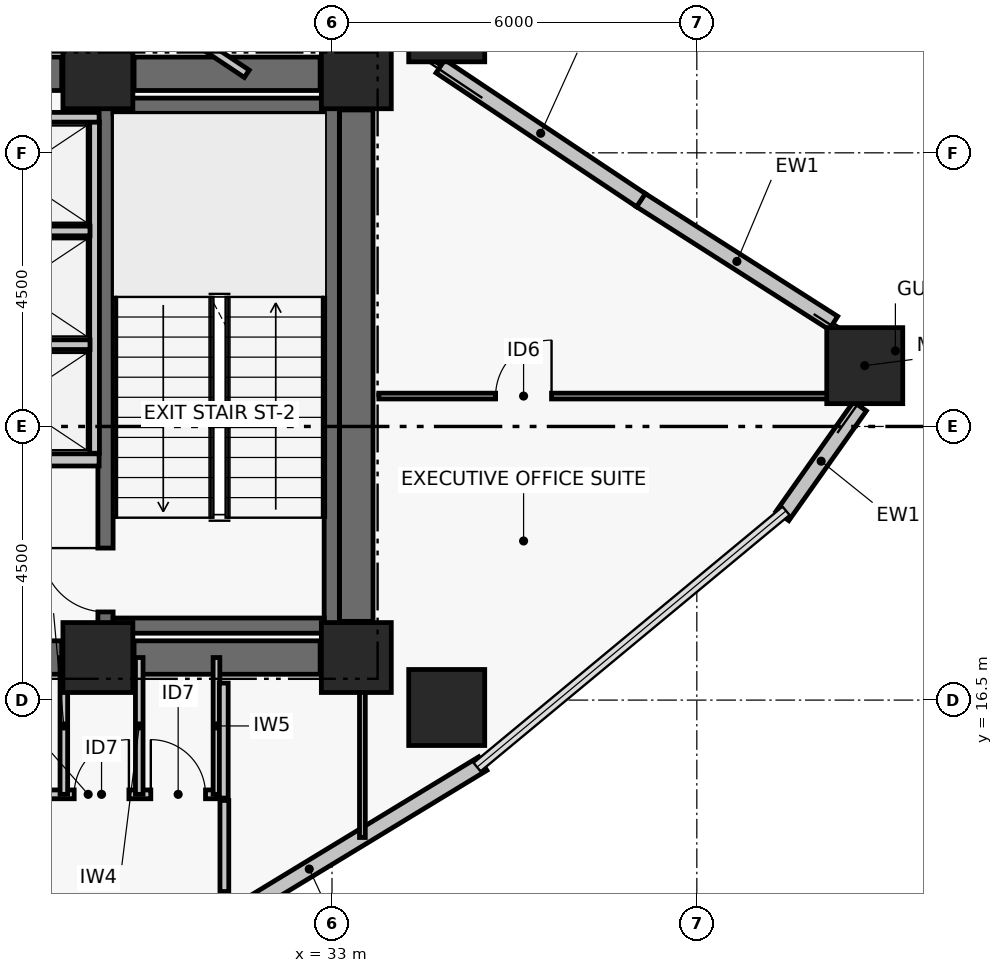
"""IFC4 building model, lengths in metres.
Left out: names, types, materials, properties, quantities, classifications, styles, units other than length and angle.
Written with IfcOpenShell. Run it as: python <this file> out.ifc"""

import sys

from ifc_helpers import new_model, si_unit, direction, frame, frame_2d, origin, origin_2d, place, context, subcontext, project, spatial, rectangle, hollow_rectangle, extrude, element, fill, save


model = new_model("IFC4")
c1 = context("Model", 3, precision=1e-05, world=origin(), true_north=direction((0.0, 1.0)))
c2 = subcontext(c1, "Body", "Model", "MODEL_VIEW")
j1 = project(units=[si_unit("LENGTHUNIT", "METRE"), si_unit("PLANEANGLEUNIT", "RADIAN")], contexts=[c1])
p1 = place(None, origin())
s1 = spatial("IfcSite", under=j1, at=p1, CompositionType="ELEMENT")
p2 = place(p1, origin())
s2 = spatial("IfcBuilding", under=s1, at=p2, CompositionType="ELEMENT")
p3 = place(p2, frame((0.0, 0.0, 103.98)))
s3 = spatial("IfcBuildingStorey", under=s2, at=p3, CompositionType="ELEMENT", Elevation=103.98)
for number, where, z_axis, x_axis in (
    (1, (29.15, 17.2, 0.0), (0.0, 0.0, 1.0), (1.0, 0.0, 0.0)),
    (2, (33.4, 17.2, 0.0), (0.0, 0.0, 1.0), (1.0, 0.0, 0.0)),
    (3, (29.15, 26.8, 0.0), (0.0, 0.0, 1.0), (1.0, 0.0, 0.0)),
    (4, (33.4, 26.8, 0.0), (0.0, 0.0, 1.0), (1.0, 0.0, 0.0)),
):
    element("IfcColumn", number, at=place(p3, frame(where, z_axis=z_axis, x_axis=x_axis)), inside=s3, PredefinedType="COLUMN", context=c2, shape_type="SweptSolid", body=[
        extrude(rectangle(XDim=1.15, YDim=1.15, at=origin_2d()), origin(), (0.0, 0.0, 1.0), 3.72),
    ])
p4 = place(p3, frame((26.85, 17.2, 0.0), z_axis=(0.0, 0.0, 1.0), x_axis=(1.0, 0.0, 0.0)))
e5 = element("IfcWall", 5, at=p4, inside=s3, PredefinedType="SHEAR", context=c2, shape_type="SweptSolid", body=[
    extrude(rectangle(XDim=1.705, YDim=0.55, at=frame_2d((0.853, 0.0))), origin(), (0.0, 0.0, 1.0), 3.47),
])
p5 = place(p3, frame((29.745, 17.2, 0.0), z_axis=(0.0, 0.0, 1.0), x_axis=(1.0, 0.0, 0.0)))
e6 = element("IfcWall", 6, at=p5, inside=s3, PredefinedType="SHEAR", context=c2, shape_type="SweptSolid", body=[
    extrude(rectangle(XDim=3.06, YDim=0.55, at=frame_2d((1.53, 0.0))), origin(), (0.0, 0.0, 1.0), 3.47),
])
p6 = place(p3, frame((26.85, 26.8, 0.0), z_axis=(0.0, 0.0, 1.0), x_axis=(1.0, 0.0, 0.0)))
e7 = element("IfcWall", 7, at=p6, inside=s3, PredefinedType="SHEAR", context=c2, shape_type="SweptSolid", body=[
    extrude(rectangle(XDim=1.705, YDim=0.55, at=frame_2d((0.853, 0.0))), origin(), (0.0, 0.0, 1.0), 3.47),
])
p7 = place(p3, frame((29.745, 26.8, 0.0), z_axis=(0.0, 0.0, 1.0), x_axis=(1.0, 0.0, 0.0)))
e8 = element("IfcWall", 8, at=p7, inside=s3, PredefinedType="SHEAR", context=c2, shape_type="SweptSolid", body=[
    extrude(rectangle(XDim=3.06, YDim=0.55, at=frame_2d((1.53, 0.0))), origin(), (0.0, 0.0, 1.0), 3.47),
])
p8 = place(p3, frame((33.4, 17.795, 0.0), z_axis=(0.0, 0.0, 1.0), x_axis=(0.0, 1.0, 0.0)))
e9 = element("IfcWall", 9, at=p8, inside=s3, PredefinedType="SHEAR", context=c2, shape_type="SweptSolid", body=[
    extrude(rectangle(XDim=8.41, YDim=0.55, at=frame_2d((4.205, 0.0))), origin(), (0.0, 0.0, 1.0), 3.47),
])
p9 = place(p3, frame((29.275, 17.6, 0.0), z_axis=(0.0, 0.0, 1.0), x_axis=(0.0, 1.0, 0.0)))
e10 = element("IfcWall", 10, at=p9, inside=s3, PredefinedType="SHEAR", context=c2, shape_type="SweptSolid", body=[
    extrude(rectangle(XDim=8.8, YDim=0.25, at=frame_2d((4.4, 0.0))), origin(), (0.0, 0.0, 1.0), 3.47),
])
p10 = place(p9, frame((0.35, 0.0, 0.0)))
e11 = element("IfcOpeningElement", 11, at=p10, cuts=e10, PredefinedType="OPENING", context=c2, shape_type="SweptSolid", body=[
    extrude(rectangle(XDim=1.05, YDim=2.08, at=frame_2d((0.525, 1.04))), frame((0.0, 0.135, 0.0), z_axis=(0.0, -1.0, 0.0), x_axis=(1.0, 0.0, 0.0)), (0.0, 0.0, 1.0), 0.27),
])
p11 = place(p3, frame((32.996, 17.6, 0.0), z_axis=(0.0, 0.0, 1.0), x_axis=(0.0, 1.0, 0.0)))
e12 = element("IfcWall", 12, at=p11, inside=s3, PredefinedType="SHEAR", context=c2, shape_type="SweptSolid", body=[
    extrude(rectangle(XDim=8.8, YDim=0.25, at=frame_2d((4.4, 0.0))), origin(), (0.0, 0.0, 1.0), 3.47),
])
for number, where, z_axis, x_axis in (
    (13, (29.4, 17.725, 0.0), (0.0, 0.0, 1.0), (1.0, 0.0, 0.0)),
    (14, (29.4, 26.275, 0.0), (0.0, 0.0, 1.0), (1.0, 0.0, 0.0)),
):
    element("IfcWall", number, at=place(p3, frame(where, z_axis=z_axis, x_axis=x_axis)), inside=s3, PredefinedType="SHEAR", context=c2, shape_type="SweptSolid", body=[
        extrude(rectangle(XDim=3.471, YDim=0.25, at=frame_2d((1.736, 0.0))), origin(), (0.0, 0.0, 1.0), 3.47),
    ])
for number, where, z_axis, x_axis in (
    (15, (41.762, 22.0, 0.0), (0.0, 0.0, 1.0), (1.0, 0.0, 0.0)),
    (16, (34.887, 27.622, 0.0), (0.0, 0.0, 1.0), (1.0, 0.0, 0.0)),
    (17, (34.887, 16.378, 0.0), (0.0, 0.0, 1.0), (1.0, 0.0, 0.0)),
):
    element("IfcColumn", number, at=place(p3, frame(where, z_axis=z_axis, x_axis=x_axis)), inside=s3, PredefinedType="COLUMN", context=c2, shape_type="SweptSolid", body=[
        extrude(hollow_rectangle(XDim=1.25, YDim=1.25, WallThickness=0.05, at=origin_2d()), origin(), (0.0, 0.0, 1.0), 3.72),
    ])
p12 = place(p3, frame((41.682, 21.331, 0.0), z_axis=(0.0, 0.0, 1.0), x_axis=(-0.577134204686, -0.816649318729, 0.0)))
e18 = element("IfcWall", 18, at=p12, inside=s3, PredefinedType="PARTITIONING", context=c2, shape_type="SweptSolid", body=[
    extrude(rectangle(XDim=2.21, YDim=0.26, at=frame_2d((1.105, 0.0))), origin(), (0.0, 0.0, 1.0), 3.47),
])
p13 = place(p3, frame((38.072, 24.727, 0.0), z_axis=(0.0, 0.0, 1.0), x_axis=(0.843033549628, -0.537860980367, 0.0)))
e19 = element("IfcWall", 19, at=p13, inside=s3, PredefinedType="PARTITIONING", context=c2, shape_type="SweptSolid", body=[
    extrude(rectangle(XDim=3.766, YDim=0.26, at=frame_2d((1.883, 0.0))), origin(), (0.0, 0.0, 1.0), 2.9),
])
p14 = place(p3, frame((34.783, 26.922, 0.0), z_axis=(0.0, 0.0, 1.0), x_axis=(0.831718676225, -0.555197301523, 0.0)))
e20 = element("IfcWall", 20, at=p14, inside=s3, PredefinedType="PARTITIONING", context=c2, shape_type="SweptSolid", body=[
    extrude(rectangle(XDim=3.966, YDim=0.26, at=frame_2d((1.983, 0.0))), origin(), (0.0, 0.0, 1.0), 2.77),
])
p15 = place(p3, frame((35.48, 15.455, 0.0), z_axis=(0.0, 0.0, 1.0), x_axis=(-0.854673977685, -0.51916509115, 0.0)))
e21 = element("IfcWall", 21, at=p15, inside=s3, PredefinedType="PARTITIONING", context=c2, shape_type="SweptSolid", body=[
    extrude(rectangle(XDim=6.678, YDim=0.26, at=frame_2d((3.339, 0.0))), origin(), (0.0, 0.0, 1.0), 3.47),
])
p16 = place(p3, frame((26.37, 20.45, 0.0), z_axis=(0.0, 0.0, 1.0), x_axis=(1.0, 0.0, 0.0)))
e22 = element("IfcWall", 22, at=p16, inside=s3, PredefinedType="PARTITIONING", context=c2, shape_type="SweptSolid", body=[
    extrude(rectangle(XDim=2.8, YDim=0.2, at=frame_2d((1.4, 0.0))), origin(), (0.0, 0.0, 1.0), 3.47),
])
p17 = place(p16, frame((0.78, 0.0, 0.0)))
e23 = element("IfcOpeningElement", 23, at=p17, cuts=e22, PredefinedType="OPENING", context=c2, shape_type="SweptSolid", body=[
    extrude(rectangle(XDim=1.1, YDim=2.08, at=frame_2d((0.55, 1.04))), frame((0.0, 0.11, 0.0), z_axis=(0.0, -1.0, 0.0), x_axis=(1.0, 0.0, 0.0)), (0.0, 0.0, 1.0), 0.22),
])
p18 = place(p3, frame((29.095, 20.56, 0.0), z_axis=(0.0, 0.0, 1.0), x_axis=(0.0, 1.0, 0.0)))
e24 = element("IfcWall", 24, at=p18, inside=s3, PredefinedType="PARTITIONING", context=c2, shape_type="SweptSolid", body=[
    extrude(rectangle(XDim=5.45, YDim=0.16, at=frame_2d((2.725, 0.0))), origin(), (0.0, 0.0, 1.0), 3.47),
])
p19 = place(p3, frame((26.37, 22.345, 0.0), z_axis=(0.0, 0.0, 1.0), x_axis=(1.0, 0.0, 0.0)))
e25 = element("IfcWall", 25, at=p19, inside=s3, PredefinedType="PARTITIONING", context=c2, shape_type="SweptSolid", body=[
    extrude(rectangle(XDim=2.65, YDim=0.16, at=frame_2d((1.325, 0.0))), origin(), (0.0, 0.0, 1.0), 3.47),
])
p20 = place(p3, frame((26.53, 24.215, 0.0), z_axis=(0.0, 0.0, 1.0), x_axis=(1.0, 0.0, 0.0)))
e26 = element("IfcWall", 26, at=p20, inside=s3, PredefinedType="PARTITIONING", context=c2, shape_type="SweptSolid", body=[
    extrude(rectangle(XDim=2.49, YDim=0.16, at=frame_2d((1.245, 0.0))), origin(), (0.0, 0.0, 1.0), 3.47),
])
p21 = place(p3, frame((26.34, 26.085, 0.0), z_axis=(0.0, 0.0, 1.0), x_axis=(1.0, 0.0, 0.0)))
e27 = element("IfcWall", 27, at=p21, inside=s3, PredefinedType="PARTITIONING", context=c2, shape_type="SweptSolid", body=[
    extrude(rectangle(XDim=2.83, YDim=0.16, at=frame_2d((1.415, 0.0))), origin(), (0.0, 0.0, 1.0), 3.47),
])
p22 = place(p3, frame((26.88, 14.95, 0.0), z_axis=(0.0, 0.0, 1.0), x_axis=(1.0, 0.0, 0.0)))
e28 = element("IfcWall", 28, at=p22, inside=s3, PredefinedType="PARTITIONING", context=c2, shape_type="SweptSolid", body=[
    extrude(rectangle(XDim=4.22, YDim=0.145, at=frame_2d((2.11, 0.0))), origin(), (0.0, 0.0, 1.0), 3.05),
])
p23 = place(p22, frame((0.39, 0.0, 0.0)))
e29 = element("IfcOpeningElement", 29, at=p23, cuts=e28, PredefinedType="OPENING", context=c2, shape_type="SweptSolid", body=[
    extrude(rectangle(XDim=0.92, YDim=2.05, at=frame_2d((0.46, 1.025))), frame((0.0, 0.083, 0.0), z_axis=(0.0, -1.0, 0.0), x_axis=(1.0, 0.0, 0.0)), (0.0, 0.0, 1.0), 0.165),
])
p24 = place(p22, frame((1.88, 0.0, 0.0)))
e30 = element("IfcOpeningElement", 30, at=p24, cuts=e28, PredefinedType="OPENING", context=c2, shape_type="SweptSolid", body=[
    extrude(rectangle(XDim=0.9, YDim=2.02, at=frame_2d((0.45, 1.01))), frame((0.0, 0.083, 0.0), z_axis=(0.0, -1.0, 0.0), x_axis=(1.0, 0.0, 0.0)), (0.0, 0.0, 1.0), 0.165),
])
p25 = place(p22, frame((3.14, 0.0, 0.0)))
e31 = element("IfcOpeningElement", 31, at=p25, cuts=e28, PredefinedType="OPENING", context=c2, shape_type="SweptSolid", body=[
    extrude(rectangle(XDim=0.9, YDim=2.02, at=frame_2d((0.45, 1.01))), frame((0.0, 0.083, 0.0), z_axis=(0.0, -1.0, 0.0), x_axis=(1.0, 0.0, 0.0)), (0.0, 0.0, 1.0), 0.165),
])
for number, where, z_axis, x_axis in (
    (32, (28.59, 14.95, 0.0), (0.0, 0.0, 1.0), (0.0, 1.0, 0.0)),
    (33, (29.83, 14.95, 0.0), (0.0, 0.0, 1.0), (0.0, 1.0, 0.0)),
):
    element("IfcWall", number, at=place(p3, frame(where, z_axis=z_axis, x_axis=x_axis)), inside=s3, PredefinedType="PARTITIONING", context=c2, shape_type="SweptSolid", body=[
        extrude(rectangle(XDim=2.25, YDim=0.125, at=frame_2d((1.125, 0.0))), origin(), (0.0, 0.0, 1.0), 2.6),
    ])
p26 = place(p3, frame((31.1, 14.95, 0.0), z_axis=(0.0, 0.0, 1.0), x_axis=(0.0, 1.0, 0.0)))
e34 = element("IfcWall", 34, at=p26, inside=s3, PredefinedType="PARTITIONING", context=c2, shape_type="SweptSolid", body=[
    extrude(rectangle(XDim=2.25, YDim=0.11, at=frame_2d((1.125, 0.0))), origin(), (0.0, 0.0, 1.0), 2.6),
])
p27 = place(p3, frame((31.23, 13.351, 0.0), z_axis=(0.0, 0.0, 1.0), x_axis=(0.0, 1.0, 0.0)))
e35 = element("IfcWall", 35, at=p27, inside=s3, PredefinedType="PARTITIONING", context=c2, shape_type="SweptSolid", body=[
    extrude(rectangle(XDim=1.499, YDim=0.145, at=frame_2d((0.75, 0.0))), origin(), (0.0, 0.0, 1.0), 2.9),
])
p28 = place(p3, frame((31.22, 14.889, 0.0), z_axis=(0.0, 0.0, 1.0), x_axis=(0.0, 1.0, 0.0)))
e36 = element("IfcWall", 36, at=p28, inside=s3, PredefinedType="PARTITIONING", context=c2, shape_type="SweptSolid", body=[
    extrude(rectangle(XDim=1.891, YDim=0.145, at=frame_2d((0.946, 0.0))), origin(), (0.0, 0.0, 1.0), 2.6),
])
p29 = place(p3, frame((31.598, 26.8, 0.0), z_axis=(0.0, 0.0, 1.0), x_axis=(-0.831758510993, 0.555137622028, 0.0)))
e37 = element("IfcWall", 37, at=p29, inside=s3, PredefinedType="PARTITIONING", context=c2, shape_type="SweptSolid", body=[
    extrude(rectangle(XDim=2.833, YDim=0.145, at=frame_2d((1.417, 0.0))), origin(), (0.0, 0.0, 1.0), 2.6),
])
p30 = place(p3, frame((33.5, 14.241, 0.0), z_axis=(0.0, 0.0, 1.0), x_axis=(0.0, 1.0, 0.0)))
e38 = element("IfcWall", 38, at=p30, inside=s3, PredefinedType="PARTITIONING", context=c2, shape_type="SweptSolid", body=[
    extrude(rectangle(XDim=2.589, YDim=0.095, at=frame_2d((1.295, 0.0))), origin(), (0.0, 0.0, 1.0), 2.6),
])
p31 = place(p3, frame((33.77, 21.5, 0.0), z_axis=(0.0, 0.0, 1.0), x_axis=(1.0, 0.0, 0.0)))
e39 = element("IfcWall", 39, at=p31, inside=s3, PredefinedType="PARTITIONING", context=c2, shape_type="SweptSolid", body=[
    extrude(rectangle(XDim=8.044, YDim=0.095, at=frame_2d((4.022, 0.0))), origin(), (0.0, 0.0, 1.0), 2.6),
])
p32 = place(p31, frame((1.921, 0.0, 0.0)))
e40 = element("IfcOpeningElement", 40, at=p32, cuts=e39, PredefinedType="OPENING", context=c2, shape_type="SweptSolid", body=[
    extrude(rectangle(XDim=0.92, YDim=2.05, at=frame_2d((0.46, 1.025))), frame((0.0, 0.057, 0.0), z_axis=(0.0, -1.0, 0.0), x_axis=(1.0, 0.0, 0.0)), (0.0, 0.0, 1.0), 0.115),
])
p33 = place(p10, origin())
e41 = element("IfcDoor", 41, at=p33, inside=s3, OperationType="SINGLE_SWING_RIGHT", PredefinedType="DOOR", context=c2, shape_type="SweptSolid", body=[
    extrude(rectangle(XDim=1.05, YDim=2.08, at=frame_2d((0.525, 1.04))), frame((0.0, 0.025, 0.0), z_axis=(0.0, -1.0, 0.0), x_axis=(1.0, 0.0, 0.0)), (0.0, 0.0, 1.0), 0.05),
])
fill(e11, e41)
p34 = place(p24, origin())
e42 = element("IfcDoor", 42, at=p34, inside=s3, OperationType="SINGLE_SWING_RIGHT", PredefinedType="DOOR", context=c2, shape_type="SweptSolid", body=[
    extrude(rectangle(XDim=0.9, YDim=2.02, at=frame_2d((0.45, 1.01))), frame((0.0, 0.025, 0.0), z_axis=(0.0, -1.0, 0.0), x_axis=(1.0, 0.0, 0.0)), (0.0, 0.0, 1.0), 0.05),
])
fill(e30, e42)
p35 = place(p25, origin())
e43 = element("IfcDoor", 43, at=p35, inside=s3, OperationType="SINGLE_SWING_LEFT", PredefinedType="DOOR", context=c2, shape_type="SweptSolid", body=[
    extrude(rectangle(XDim=0.9, YDim=2.02, at=frame_2d((0.45, 1.01))), frame((0.0, 0.025, 0.0), z_axis=(0.0, -1.0, 0.0), x_axis=(1.0, 0.0, 0.0)), (0.0, 0.0, 1.0), 0.05),
])
fill(e31, e43)
p36 = place(p32, origin())
e44 = element("IfcDoor", 44, at=p36, inside=s3, OperationType="SINGLE_SWING_RIGHT", PredefinedType="DOOR", context=c2, shape_type="SweptSolid", body=[
    extrude(rectangle(XDim=0.92, YDim=2.05, at=frame_2d((0.46, 1.025))), frame((0.0, 0.025, 0.0), z_axis=(0.0, -1.0, 0.0), x_axis=(1.0, 0.0, 0.0)), (0.0, 0.0, 1.0), 0.05),
])
fill(e40, e44)
save(model, sys.argv[1])
